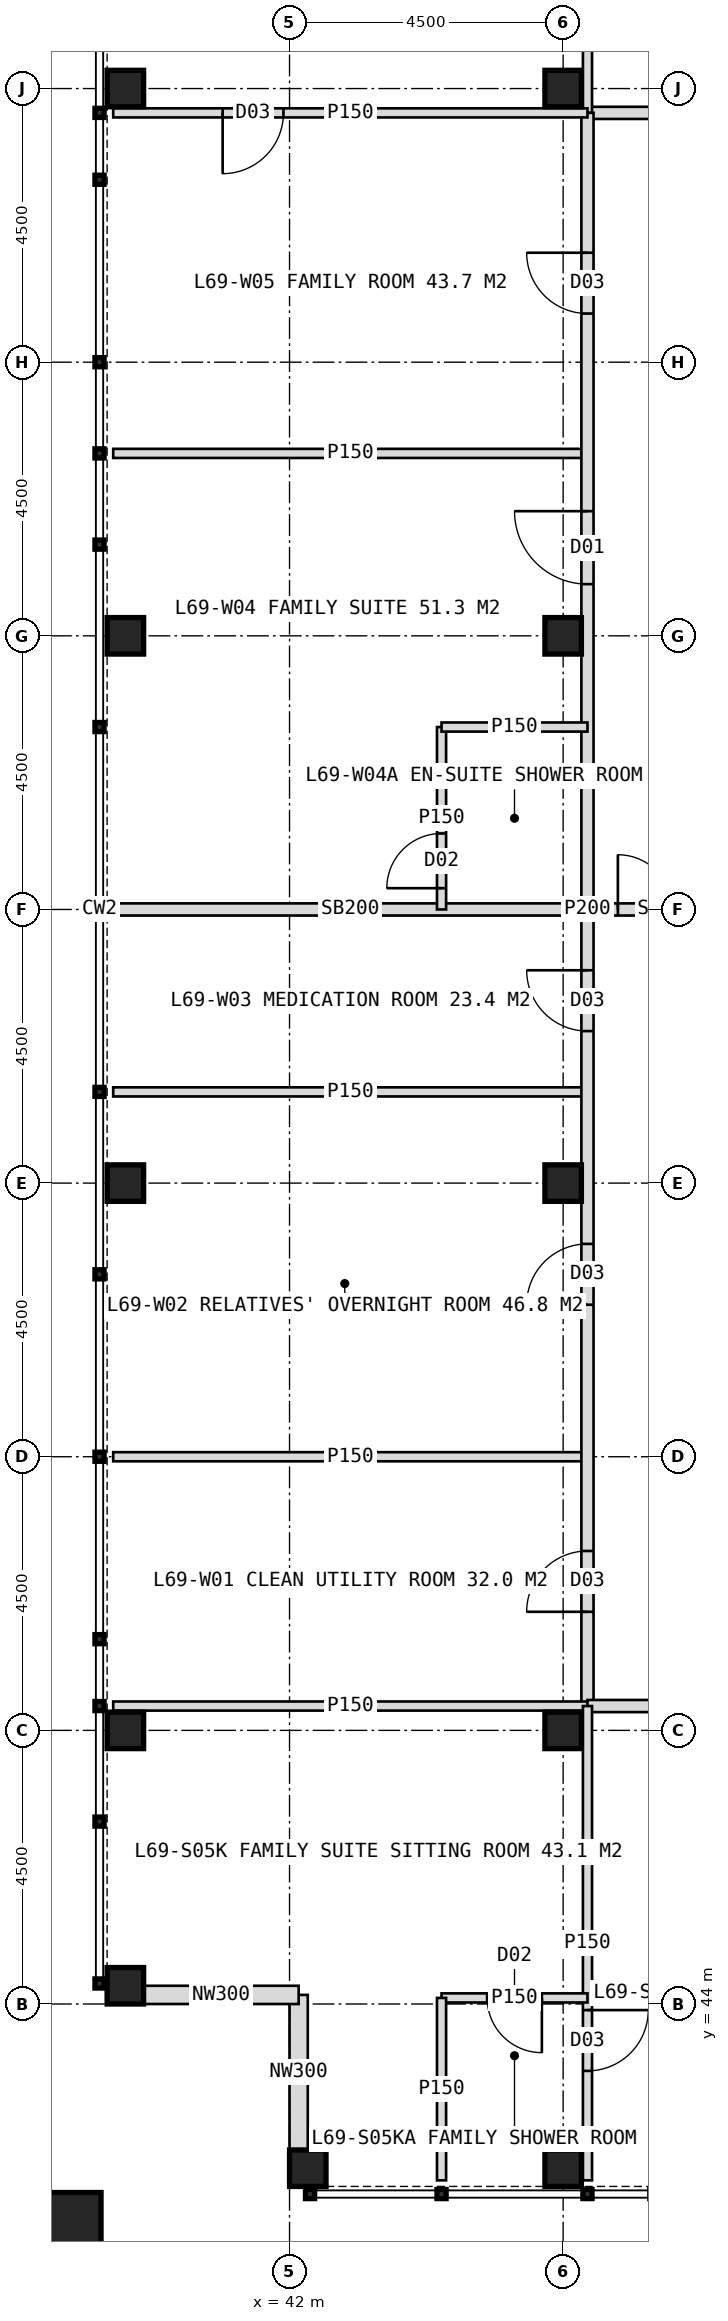
"""IFC4 building model, lengths in metres.
Left out: names, types, materials, properties, quantities, classifications, styles, units other than length and angle.
Written with IfcOpenShell. Run it as: python <this file> out.ifc"""

import sys

from ifc_helpers import new_model, si_unit, direction, frame, frame_2d, origin, origin_2d, place, context, subcontext, project, spatial, rectangle, hollow_rectangle, extrude, element, fill, save


model = new_model("IFC4")
c1 = context("Model", 3, precision=1e-05, world=origin(), true_north=direction((0.0, 1.0)))
c2 = subcontext(c1, "Body", "Model", "MODEL_VIEW")
j1 = project(units=[si_unit("LENGTHUNIT", "METRE"), si_unit("PLANEANGLEUNIT", "RADIAN")], contexts=[c1])
p1 = place(None, origin())
s1 = spatial("IfcSite", under=j1, at=p1, CompositionType="ELEMENT")
p2 = place(p1, origin())
s2 = spatial("IfcBuilding", under=s1, at=p2, CompositionType="ELEMENT")
p3 = place(p2, frame((0.0, 0.0, 286.0)))
s3 = spatial("IfcBuildingStorey", under=s2, at=p3, CompositionType="ELEMENT", Elevation=286.0)
for number, where, z_axis, x_axis in (
    (1, (46.5, 48.5, 0.0), (0.0, 0.0, 1.0), (1.0, 0.0, 0.0)),
    (2, (46.5, 75.5, 0.0), (0.0, 0.0, 1.0), (1.0, 0.0, 0.0)),
    (3, (46.5, 57.5, 0.0), (0.0, 0.0, 1.0), (1.0, 0.0, 0.0)),
    (4, (46.5, 66.5, 0.0), (0.0, 0.0, 1.0), (1.0, 0.0, 0.0)),
    (5, (42.3, 41.3, 0.0), (0.0, 0.0, 1.0), (1.0, 0.0, 0.0)),
    (6, (39.3, 44.3, 0.0), (0.0, 0.0, 1.0), (1.0, 0.0, 0.0)),
    (7, (46.5, 41.3, 0.0), (0.0, 0.0, 1.0), (1.0, 0.0, 0.0)),
    (8, (39.3, 48.5, 0.0), (0.0, 0.0, 1.0), (1.0, 0.0, 0.0)),
    (9, (39.3, 57.5, 0.0), (0.0, 0.0, 1.0), (1.0, 0.0, 0.0)),
    (10, (39.3, 66.5, 0.0), (0.0, 0.0, 1.0), (1.0, 0.0, 0.0)),
    (11, (39.3, 75.5, 0.0), (0.0, 0.0, 1.0), (1.0, 0.0, 0.0)),
):
    element("IfcColumn", number, at=place(p3, frame(where, z_axis=z_axis, x_axis=x_axis)), inside=s3, PredefinedType="COLUMN", context=c2, shape_type="SweptSolid", body=[
        extrude(hollow_rectangle(XDim=0.6, YDim=0.6, WallThickness=0.04, at=origin_2d()), origin(), (0.0, 0.0, 1.0), 4.0),
    ])
p4 = place(p3, frame((38.4, 40.4, 0.0), z_axis=(0.0, 0.0, 1.0), x_axis=(1.0, 0.0, 0.0)))
e12 = element("IfcColumn", 12, at=p4, inside=s3, PredefinedType="COLUMN", context=c2, shape_type="SweptSolid", body=[
    extrude(hollow_rectangle(XDim=1.0, YDim=1.0, WallThickness=0.06, at=origin_2d()), origin(), (0.0, 0.0, 1.0), 4.0),
])
for number, where, z_axis, x_axis in (
    (13, (42.15, 41.6, 0.0), (0.0, 0.0, 1.0), (0.0, 1.0, 0.0)),
    (14, (42.15, 44.15, 0.0), (0.0, 0.0, 1.0), (-1.0, 0.0, 0.0)),
):
    element("IfcWall", number, at=place(p3, frame(where, z_axis=z_axis, x_axis=x_axis)), inside=s3, PredefinedType="ELEMENTEDWALL", context=c2, shape_type="SweptSolid", body=[
        extrude(rectangle(XDim=2.55, YDim=0.3, at=frame_2d((1.275, 0.0))), origin(), (0.0, 0.0, 1.0), 2.95),
    ])
p5 = place(p3, frame((46.9, 75.1, 0.0), z_axis=(0.0, 0.0, 1.0), x_axis=(1.0, 0.0, 0.0)))
e15 = element("IfcWall", 15, at=p5, inside=s3, PredefinedType="PARTITIONING", context=c2, shape_type="SweptSolid", body=[
    extrude(rectangle(XDim=26.2, YDim=0.2, at=frame_2d((13.1, 0.0))), origin(), (0.0, 0.0, 1.0), 3.75),
])
p6 = place(p5, frame((1.55, 0.0, 0.0)))
e16 = element("IfcOpeningElement", 16, at=p6, cuts=e15, PredefinedType="OPENING", context=c2, shape_type="SweptSolid", body=[
    extrude(rectangle(XDim=1.0, YDim=2.1, at=frame_2d((0.5, 1.05))), frame((0.0, 0.11, 0.0), z_axis=(0.0, -1.0, 0.0), x_axis=(1.0, 0.0, 0.0)), (0.0, 0.0, 1.0), 0.22),
])
p7 = place(p5, frame((6.75, 0.0, 0.0)))
e17 = element("IfcOpeningElement", 17, at=p7, cuts=e15, PredefinedType="OPENING", context=c2, shape_type="SweptSolid", body=[
    extrude(rectangle(XDim=1.0, YDim=2.1, at=frame_2d((0.5, 1.05))), frame((0.0, 0.11, 0.0), z_axis=(0.0, -1.0, 0.0), x_axis=(1.0, 0.0, 0.0)), (0.0, 0.0, 1.0), 0.22),
])
p8 = place(p5, frame((14.25, 0.0, 0.0)))
e18 = element("IfcOpeningElement", 18, at=p8, cuts=e15, PredefinedType="OPENING", context=c2, shape_type="SweptSolid", body=[
    extrude(rectangle(XDim=1.2, YDim=2.2, at=frame_2d((0.6, 1.1))), frame((0.0, 0.11, 0.0), z_axis=(0.0, -1.0, 0.0), x_axis=(1.0, 0.0, 0.0)), (0.0, 0.0, 1.0), 0.22),
])
p9 = place(p5, frame((18.45, 0.0, 0.0)))
e19 = element("IfcOpeningElement", 19, at=p9, cuts=e15, PredefinedType="OPENING", context=c2, shape_type="SweptSolid", body=[
    extrude(rectangle(XDim=1.0, YDim=2.1, at=frame_2d((0.5, 1.05))), frame((0.0, 0.11, 0.0), z_axis=(0.0, -1.0, 0.0), x_axis=(1.0, 0.0, 0.0)), (0.0, 0.0, 1.0), 0.22),
])
p10 = place(p5, frame((23.25, 0.0, 0.0)))
e20 = element("IfcOpeningElement", 20, at=p10, cuts=e15, PredefinedType="OPENING", context=c2, shape_type="SweptSolid", body=[
    extrude(rectangle(XDim=1.2, YDim=2.2, at=frame_2d((0.6, 1.1))), frame((0.0, 0.11, 0.0), z_axis=(0.0, -1.0, 0.0), x_axis=(1.0, 0.0, 0.0)), (0.0, 0.0, 1.0), 0.22),
])
for number, where, z_axis, x_axis in (
    (21, (46.9, 75.1, 0.0), (0.0, 0.0, 1.0), (0.0, 1.0, 0.0)),
    (22, (46.9, 53.0, 0.0), (0.0, 0.0, 1.0), (-1.0, 0.0, 0.0)),
    (23, (46.9, 59.0, 0.0), (0.0, 0.0, 1.0), (-1.0, 0.0, 0.0)),
):
    element("IfcWall", number, at=place(p3, frame(where, z_axis=z_axis, x_axis=x_axis)), inside=s3, PredefinedType="PARTITIONING", context=c2, shape_type="SweptSolid", body=[
        extrude(rectangle(XDim=7.8, YDim=0.15, at=frame_2d((3.9, 0.0))), origin(), (0.0, 0.0, 1.0), 3.75),
    ])
p11 = place(p3, frame((46.9, 62.0, 0.0), z_axis=(0.0, 0.0, 1.0), x_axis=(-1.0, 0.0, 0.0)))
e24 = element("IfcWall", 24, at=p11, inside=s3, PredefinedType="SOLIDWALL", context=c2, shape_type="SweptSolid", body=[
    extrude(rectangle(XDim=7.8, YDim=0.2, at=frame_2d((3.9, 0.0))), origin(), (0.0, 0.0, 1.0), 2.997),
])
p12 = place(p3, frame((46.9, 69.5, 0.0), z_axis=(0.0, 0.0, 1.0), x_axis=(-1.0, 0.0, 0.0)))
e25 = element("IfcWall", 25, at=p12, inside=s3, PredefinedType="PARTITIONING", context=c2, shape_type="SweptSolid", body=[
    extrude(rectangle(XDim=7.8, YDim=0.15, at=frame_2d((3.9, 0.0))), origin(), (0.0, 0.0, 1.0), 3.75),
])
p13 = place(p3, frame((46.9, 48.9, 0.0), z_axis=(0.0, 0.0, 1.0), x_axis=(0.0, 1.0, 0.0)))
e26 = element("IfcWall", 26, at=p13, inside=s3, PredefinedType="PARTITIONING", context=c2, shape_type="SweptSolid", body=[
    extrude(rectangle(XDim=26.2, YDim=0.2, at=frame_2d((13.1, 0.0))), origin(), (0.0, 0.0, 1.0), 3.75),
])
p14 = place(p13, frame((1.55, 0.0, 0.0)))
e27 = element("IfcOpeningElement", 27, at=p14, cuts=e26, PredefinedType="OPENING", context=c2, shape_type="SweptSolid", body=[
    extrude(rectangle(XDim=1.0, YDim=2.1, at=frame_2d((0.5, 1.05))), frame((0.0, 0.11, 0.0), z_axis=(0.0, -1.0, 0.0), x_axis=(1.0, 0.0, 0.0)), (0.0, 0.0, 1.0), 0.22),
])
p15 = place(p13, frame((6.6, 0.0, 0.0)))
e28 = element("IfcOpeningElement", 28, at=p15, cuts=e26, PredefinedType="OPENING", context=c2, shape_type="SweptSolid", body=[
    extrude(rectangle(XDim=1.0, YDim=2.1, at=frame_2d((0.5, 1.05))), frame((0.0, 0.11, 0.0), z_axis=(0.0, -1.0, 0.0), x_axis=(1.0, 0.0, 0.0)), (0.0, 0.0, 1.0), 0.22),
])
p16 = place(p13, frame((11.1, 0.0, 0.0)))
e29 = element("IfcOpeningElement", 29, at=p16, cuts=e26, PredefinedType="OPENING", context=c2, shape_type="SweptSolid", body=[
    extrude(rectangle(XDim=1.0, YDim=2.1, at=frame_2d((0.5, 1.05))), frame((0.0, 0.11, 0.0), z_axis=(0.0, -1.0, 0.0), x_axis=(1.0, 0.0, 0.0)), (0.0, 0.0, 1.0), 0.22),
])
p17 = place(p13, frame((18.45, 0.0, 0.0)))
e30 = element("IfcOpeningElement", 30, at=p17, cuts=e26, PredefinedType="OPENING", context=c2, shape_type="SweptSolid", body=[
    extrude(rectangle(XDim=1.2, YDim=2.2, at=frame_2d((0.6, 1.1))), frame((0.0, 0.11, 0.0), z_axis=(0.0, -1.0, 0.0), x_axis=(1.0, 0.0, 0.0)), (0.0, 0.0, 1.0), 0.22),
])
p18 = place(p13, frame((22.9, 0.0, 0.0)))
e31 = element("IfcOpeningElement", 31, at=p18, cuts=e26, PredefinedType="OPENING", context=c2, shape_type="SweptSolid", body=[
    extrude(rectangle(XDim=1.0, YDim=2.1, at=frame_2d((0.5, 1.05))), frame((0.0, 0.11, 0.0), z_axis=(0.0, -1.0, 0.0), x_axis=(1.0, 0.0, 0.0)), (0.0, 0.0, 1.0), 0.22),
])
p19 = place(p3, frame((46.9, 48.9, 0.0), z_axis=(0.0, 0.0, 1.0), x_axis=(-1.0, 0.0, 0.0)))
e32 = element("IfcWall", 32, at=p19, inside=s3, PredefinedType="PARTITIONING", context=c2, shape_type="SweptSolid", body=[
    extrude(rectangle(XDim=7.8, YDim=0.15, at=frame_2d((3.9, 0.0))), origin(), (0.0, 0.0, 1.0), 3.75),
])
p20 = place(p3, frame((44.5, 62.0, 0.0), z_axis=(0.0, 0.0, 1.0), x_axis=(0.0, 1.0, 0.0)))
e33 = element("IfcWall", 33, at=p20, inside=s3, PredefinedType="PARTITIONING", context=c2, shape_type="SweptSolid", body=[
    extrude(rectangle(XDim=3.0, YDim=0.15, at=frame_2d((1.5, 0.0))), origin(), (0.0, 0.0, 1.0), 3.75),
])
p21 = place(p20, frame((0.35, 0.0, 0.0)))
e34 = element("IfcOpeningElement", 34, at=p21, cuts=e33, PredefinedType="OPENING", context=c2, shape_type="SweptSolid", body=[
    extrude(rectangle(XDim=0.9, YDim=2.1, at=frame_2d((0.45, 1.05))), frame((0.0, 0.085, 0.0), z_axis=(0.0, -1.0, 0.0), x_axis=(1.0, 0.0, 0.0)), (0.0, 0.0, 1.0), 0.17),
])
p22 = place(p3, frame((46.9, 65.0, 0.0), z_axis=(0.0, 0.0, 1.0), x_axis=(-1.0, 0.0, 0.0)))
e35 = element("IfcWall", 35, at=p22, inside=s3, PredefinedType="PARTITIONING", context=c2, shape_type="SweptSolid", body=[
    extrude(rectangle(XDim=2.4, YDim=0.15, at=frame_2d((1.2, 0.0))), origin(), (0.0, 0.0, 1.0), 3.75),
])
p23 = place(p3, frame((46.9, 75.1, 0.0), z_axis=(0.0, 0.0, 1.0), x_axis=(-1.0, 0.0, 0.0)))
e36 = element("IfcWall", 36, at=p23, inside=s3, PredefinedType="PARTITIONING", context=c2, shape_type="SweptSolid", body=[
    extrude(rectangle(XDim=7.8, YDim=0.15, at=frame_2d((3.9, 0.0))), origin(), (0.0, 0.0, 1.0), 3.75),
])
p24 = place(p23, frame((5.0, 0.0, 0.0)))
e37 = element("IfcOpeningElement", 37, at=p24, cuts=e36, PredefinedType="OPENING", context=c2, shape_type="SweptSolid", body=[
    extrude(rectangle(XDim=1.0, YDim=2.1, at=frame_2d((0.5, 1.05))), frame((0.0, 0.085, 0.0), z_axis=(0.0, -1.0, 0.0), x_axis=(1.0, 0.0, 0.0)), (0.0, 0.0, 1.0), 0.17),
])
p25 = place(p3, frame((73.1, 48.9, 0.0), z_axis=(0.0, 0.0, 1.0), x_axis=(-1.0, 0.0, 0.0)))
e38 = element("IfcWall", 38, at=p25, inside=s3, PredefinedType="PARTITIONING", context=c2, shape_type="SweptSolid", body=[
    extrude(rectangle(XDim=26.2, YDim=0.2, at=frame_2d((13.1, 0.0))), origin(), (0.0, 0.0, 1.0), 3.75),
])
p26 = place(p25, frame((1.75, 0.0, 0.0)))
e39 = element("IfcOpeningElement", 39, at=p26, cuts=e38, PredefinedType="OPENING", context=c2, shape_type="SweptSolid", body=[
    extrude(rectangle(XDim=1.2, YDim=2.2, at=frame_2d((0.6, 1.1))), frame((0.0, 0.11, 0.0), z_axis=(0.0, -1.0, 0.0), x_axis=(1.0, 0.0, 0.0)), (0.0, 0.0, 1.0), 0.22),
])
p27 = place(p25, frame((6.75, 0.0, 0.0)))
e40 = element("IfcOpeningElement", 40, at=p27, cuts=e38, PredefinedType="OPENING", context=c2, shape_type="SweptSolid", body=[
    extrude(rectangle(XDim=1.0, YDim=2.1, at=frame_2d((0.5, 1.05))), frame((0.0, 0.11, 0.0), z_axis=(0.0, -1.0, 0.0), x_axis=(1.0, 0.0, 0.0)), (0.0, 0.0, 1.0), 0.22),
])
p28 = place(p25, frame((11.85, 0.0, 0.0)))
e41 = element("IfcOpeningElement", 41, at=p28, cuts=e38, PredefinedType="OPENING", context=c2, shape_type="SweptSolid", body=[
    extrude(rectangle(XDim=1.0, YDim=2.1, at=frame_2d((0.5, 1.05))), frame((0.0, 0.11, 0.0), z_axis=(0.0, -1.0, 0.0), x_axis=(1.0, 0.0, 0.0)), (0.0, 0.0, 1.0), 0.22),
])
p29 = place(p25, frame((15.75, 0.0, 0.0)))
e42 = element("IfcOpeningElement", 42, at=p29, cuts=e38, PredefinedType="OPENING", context=c2, shape_type="SweptSolid", body=[
    extrude(rectangle(XDim=1.0, YDim=2.1, at=frame_2d((0.5, 1.05))), frame((0.0, 0.11, 0.0), z_axis=(0.0, -1.0, 0.0), x_axis=(1.0, 0.0, 0.0)), (0.0, 0.0, 1.0), 0.22),
])
p30 = place(p25, frame((23.25, 0.0, 0.0)))
e43 = element("IfcOpeningElement", 43, at=p30, cuts=e38, PredefinedType="OPENING", context=c2, shape_type="SweptSolid", body=[
    extrude(rectangle(XDim=1.2, YDim=2.2, at=frame_2d((0.6, 1.1))), frame((0.0, 0.11, 0.0), z_axis=(0.0, -1.0, 0.0), x_axis=(1.0, 0.0, 0.0)), (0.0, 0.0, 1.0), 0.22),
])
p31 = place(p3, frame((46.9, 48.9, 0.0), z_axis=(0.0, 0.0, 1.0), x_axis=(0.0, -1.0, 0.0)))
e44 = element("IfcWall", 44, at=p31, inside=s3, PredefinedType="PARTITIONING", context=c2, shape_type="SweptSolid", body=[
    extrude(rectangle(XDim=7.8, YDim=0.15, at=frame_2d((3.9, 0.0))), origin(), (0.0, 0.0, 1.0), 3.75),
])
p32 = place(p31, frame((5.0, 0.0, 0.0)))
e45 = element("IfcOpeningElement", 45, at=p32, cuts=e44, PredefinedType="OPENING", context=c2, shape_type="SweptSolid", body=[
    extrude(rectangle(XDim=1.0, YDim=2.1, at=frame_2d((0.5, 1.05))), frame((0.0, 0.085, 0.0), z_axis=(0.0, -1.0, 0.0), x_axis=(1.0, 0.0, 0.0)), (0.0, 0.0, 1.0), 0.17),
])
p33 = place(p3, frame((46.9, 44.1, 0.0), z_axis=(0.0, 0.0, 1.0), x_axis=(-1.0, 0.0, 0.0)))
e46 = element("IfcWall", 46, at=p33, inside=s3, PredefinedType="PARTITIONING", context=c2, shape_type="SweptSolid", body=[
    extrude(rectangle(XDim=2.4, YDim=0.15, at=frame_2d((1.2, 0.0))), origin(), (0.0, 0.0, 1.0), 3.75),
])
p34 = place(p33, frame((0.75, 0.0, 0.0)))
e47 = element("IfcOpeningElement", 47, at=p34, cuts=e46, PredefinedType="OPENING", context=c2, shape_type="SweptSolid", body=[
    extrude(rectangle(XDim=0.9, YDim=2.1, at=frame_2d((0.45, 1.05))), frame((0.0, 0.085, 0.0), z_axis=(0.0, -1.0, 0.0), x_axis=(1.0, 0.0, 0.0)), (0.0, 0.0, 1.0), 0.17),
])
p35 = place(p3, frame((44.5, 44.1, 0.0), z_axis=(0.0, 0.0, 1.0), x_axis=(0.0, -1.0, 0.0)))
e48 = element("IfcWall", 48, at=p35, inside=s3, PredefinedType="PARTITIONING", context=c2, shape_type="SweptSolid", body=[
    extrude(rectangle(XDim=3.0, YDim=0.15, at=frame_2d((1.5, 0.0))), origin(), (0.0, 0.0, 1.0), 3.75),
])
p36 = place(p3, frame((49.5, 62.0, 0.0), z_axis=(0.0, 0.0, 1.0), x_axis=(-1.0, 0.0, 0.0)))
e49 = element("IfcWall", 49, at=p36, inside=s3, PredefinedType="SOLIDWALL", context=c2, shape_type="SweptSolid", body=[
    extrude(rectangle(XDim=2.6, YDim=0.2, at=frame_2d((1.3, 0.0))), origin(), (0.0, 0.0, 1.0), 2.997),
])
p37 = place(p36, frame((0.3, 0.0, 0.0)))
e50 = element("IfcOpeningElement", 50, at=p37, cuts=e49, PredefinedType="OPENING", context=c2, shape_type="SweptSolid", body=[
    extrude(rectangle(XDim=1.8, YDim=2.2, at=frame_2d((0.9, 1.1))), frame((0.0, 0.11, 0.0), z_axis=(0.0, -1.0, 0.0), x_axis=(1.0, 0.0, 0.0)), (0.0, 0.0, 1.0), 0.22),
])
p38 = place(p14, origin())
e51 = element("IfcDoor", 51, at=p38, inside=s3, OperationType="SINGLE_SWING_LEFT", PredefinedType="DOOR", context=c2, shape_type="SweptSolid", body=[
    extrude(rectangle(XDim=1.0, YDim=2.1, at=frame_2d((0.5, 1.05))), frame((0.0, 0.025, 0.0), z_axis=(0.0, -1.0, 0.0), x_axis=(1.0, 0.0, 0.0)), (0.0, 0.0, 1.0), 0.05),
])
fill(e27, e51)
p39 = place(p15, origin())
e52 = element("IfcDoor", 52, at=p39, inside=s3, OperationType="SINGLE_SWING_LEFT", PredefinedType="DOOR", context=c2, shape_type="SweptSolid", body=[
    extrude(rectangle(XDim=1.0, YDim=2.1, at=frame_2d((0.5, 1.05))), frame((0.0, 0.025, 0.0), z_axis=(0.0, -1.0, 0.0), x_axis=(1.0, 0.0, 0.0)), (0.0, 0.0, 1.0), 0.05),
])
fill(e28, e52)
p40 = place(p16, origin())
e53 = element("IfcDoor", 53, at=p40, inside=s3, OperationType="SINGLE_SWING_RIGHT", PredefinedType="DOOR", context=c2, shape_type="SweptSolid", body=[
    extrude(rectangle(XDim=1.0, YDim=2.1, at=frame_2d((0.5, 1.05))), frame((0.0, 0.025, 0.0), z_axis=(0.0, -1.0, 0.0), x_axis=(1.0, 0.0, 0.0)), (0.0, 0.0, 1.0), 0.05),
])
fill(e29, e53)
p41 = place(p17, origin())
e54 = element("IfcDoor", 54, at=p41, inside=s3, OperationType="SINGLE_SWING_RIGHT", PredefinedType="DOOR", context=c2, shape_type="SweptSolid", body=[
    extrude(rectangle(XDim=1.2, YDim=2.2, at=frame_2d((0.6, 1.1))), frame((0.0, 0.025, 0.0), z_axis=(0.0, -1.0, 0.0), x_axis=(1.0, 0.0, 0.0)), (0.0, 0.0, 1.0), 0.05),
])
fill(e30, e54)
p42 = place(p21, origin())
e55 = element("IfcDoor", 55, at=p42, inside=s3, OperationType="SINGLE_SWING_LEFT", PredefinedType="DOOR", context=c2, shape_type="SweptSolid", body=[
    extrude(rectangle(XDim=0.9, YDim=2.1, at=frame_2d((0.45, 1.05))), frame((0.0, 0.025, 0.0), z_axis=(0.0, -1.0, 0.0), x_axis=(1.0, 0.0, 0.0)), (0.0, 0.0, 1.0), 0.05),
])
fill(e34, e55)
p43 = place(p24, origin())
e56 = element("IfcDoor", 56, at=p43, inside=s3, OperationType="SINGLE_SWING_RIGHT", PredefinedType="DOOR", context=c2, shape_type="SweptSolid", body=[
    extrude(rectangle(XDim=1.0, YDim=2.1, at=frame_2d((0.5, 1.05))), frame((0.0, 0.025, 0.0), z_axis=(0.0, -1.0, 0.0), x_axis=(1.0, 0.0, 0.0)), (0.0, 0.0, 1.0), 0.05),
])
fill(e37, e56)
p44 = place(p18, origin())
e57 = element("IfcDoor", 57, at=p44, inside=s3, OperationType="SINGLE_SWING_RIGHT", PredefinedType="DOOR", context=c2, shape_type="SweptSolid", body=[
    extrude(rectangle(XDim=1.0, YDim=2.1, at=frame_2d((0.5, 1.05))), frame((0.0, 0.025, 0.0), z_axis=(0.0, -1.0, 0.0), x_axis=(1.0, 0.0, 0.0)), (0.0, 0.0, 1.0), 0.05),
])
fill(e31, e57)
p45 = place(p34, origin())
e58 = element("IfcDoor", 58, at=p45, inside=s3, OperationType="SINGLE_SWING_LEFT", PredefinedType="DOOR", context=c2, shape_type="SweptSolid", body=[
    extrude(rectangle(XDim=0.9, YDim=2.1, at=frame_2d((0.45, 1.05))), frame((0.0, 0.025, 0.0), z_axis=(0.0, -1.0, 0.0), x_axis=(1.0, 0.0, 0.0)), (0.0, 0.0, 1.0), 0.05),
])
fill(e47, e58)
p46 = place(p32, origin())
e59 = element("IfcDoor", 59, at=p46, inside=s3, OperationType="SINGLE_SWING_LEFT", PredefinedType="DOOR", context=c2, shape_type="SweptSolid", body=[
    extrude(rectangle(XDim=1.0, YDim=2.1, at=frame_2d((0.5, 1.05))), frame((0.0, 0.025, 0.0), z_axis=(0.0, -1.0, 0.0), x_axis=(1.0, 0.0, 0.0)), (0.0, 0.0, 1.0), 0.05),
])
fill(e45, e59)
p47 = place(p37, origin())
e60 = element("IfcDoor", 60, at=p47, inside=s3, OperationType="DOUBLE_DOOR_DOUBLE_SWING", PredefinedType="DOOR", context=c2, shape_type="SweptSolid", body=[
    extrude(rectangle(XDim=1.8, YDim=2.2, at=frame_2d((0.9, 1.1))), frame((0.0, 0.025, 0.0), z_axis=(0.0, -1.0, 0.0), x_axis=(1.0, 0.0, 0.0)), (0.0, 0.0, 1.0), 0.05),
])
fill(e50, e60)
save(model, sys.argv[1])
